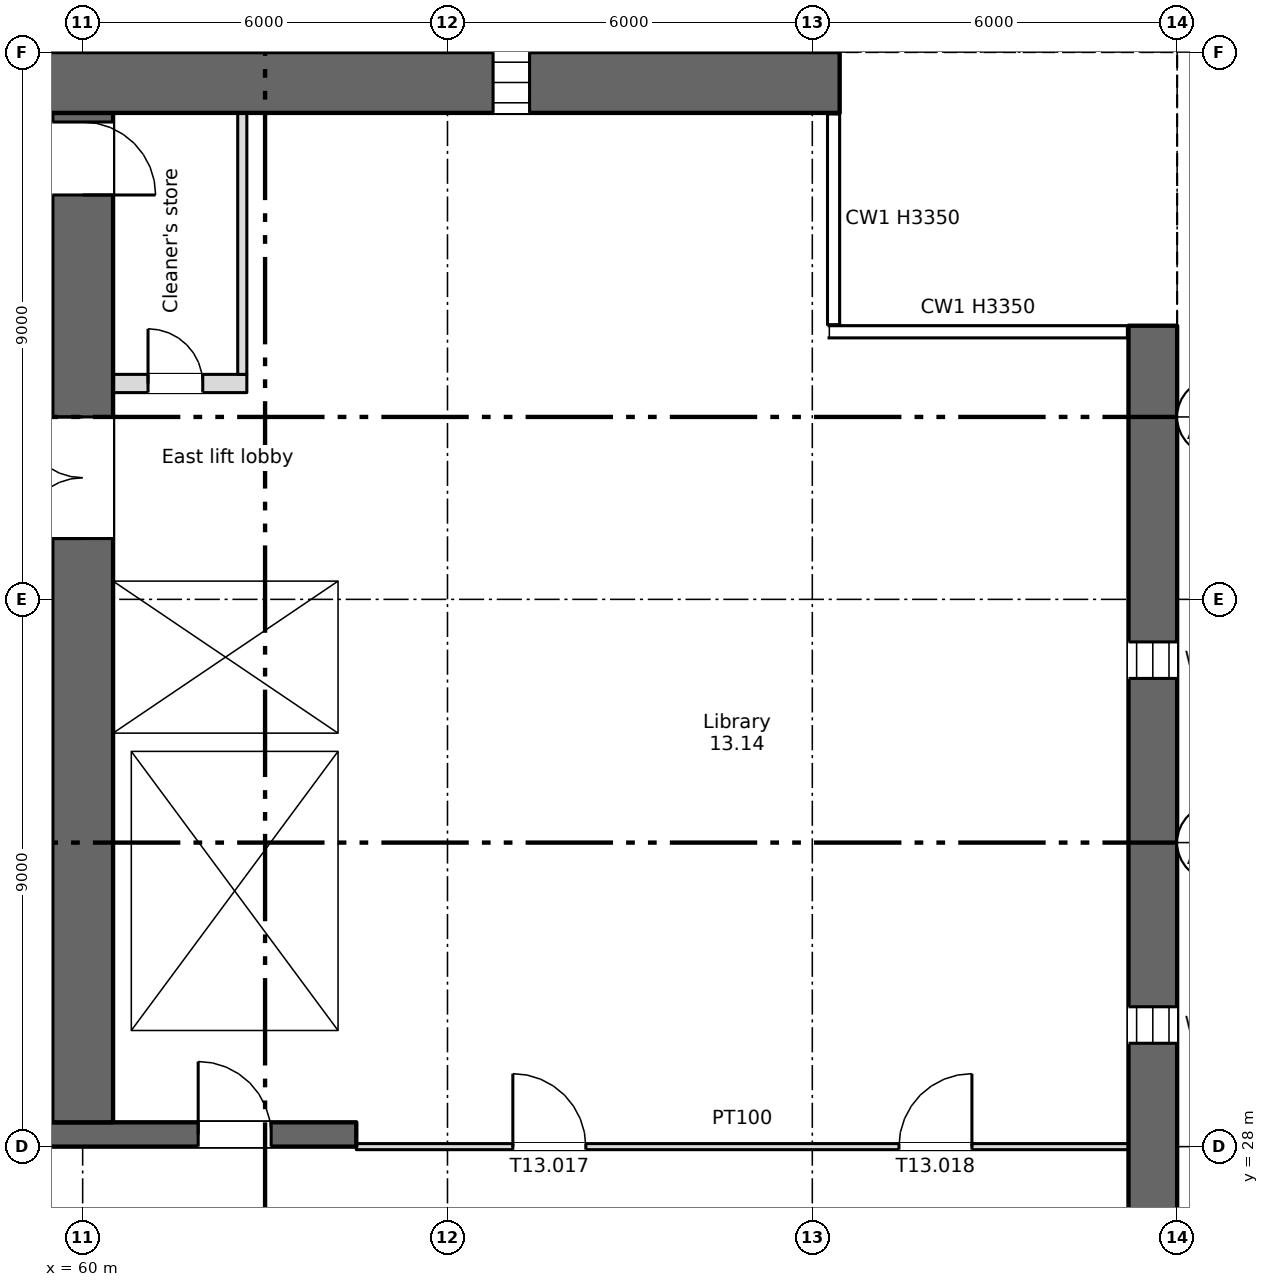
"""IFC4 building model, lengths in metres.
Left out: names, types, materials, properties, quantities, classifications, styles, units other than length and angle.
Written with IfcOpenShell. Run it as: python <this file> out.ifc"""

import sys

from ifc_helpers import new_model, si_unit, direction, frame, frame_2d, origin, place, context, subcontext, project, spatial, rectangle, extrude, element, fill, save


model = new_model("IFC4")
c1 = context("Model", 3, precision=1e-05, world=origin(), true_north=direction((0.0, 1.0)))
c2 = subcontext(c1, "Body", "Model", "MODEL_VIEW")
j1 = project(units=[si_unit("LENGTHUNIT", "METRE"), si_unit("PLANEANGLEUNIT", "RADIAN")], contexts=[c1])
p1 = place(None, origin())
s1 = spatial("IfcSite", under=j1, at=p1, CompositionType="ELEMENT")
p2 = place(p1, origin())
s2 = spatial("IfcBuilding", under=s1, at=p2, CompositionType="ELEMENT")
p3 = place(p2, frame((0.0, 0.0, 67.5)))
s3 = spatial("IfcBuildingStorey", under=s2, at=p3, CompositionType="ELEMENT", Elevation=67.5)
p4 = place(p3, frame((77.6, 4.5, 0.0), z_axis=(0.0, 0.0, 1.0), x_axis=(0.0, 1.0, 0.0)))
e1 = element("IfcWall", 1, at=p4, inside=s3, PredefinedType="SHEAR", context=c2, shape_type="SweptSolid", body=[
    extrude(rectangle(XDim=37.0, YDim=0.8, at=frame_2d((18.5, 0.0))), origin(), (0.0, 0.0, 1.0), 3.35),
])
p5 = place(p4, frame((1.2, 0.0, 0.6)))
e2 = element("IfcOpeningElement", 2, at=p5, cuts=e1, PredefinedType="OPENING", context=c2, shape_type="SweptSolid", body=[
    extrude(rectangle(XDim=0.6, YDim=2.4, at=frame_2d((0.3, 1.2))), frame((0.0, 0.41, 0.0), z_axis=(0.0, -1.0, 0.0), x_axis=(1.0, 0.0, 0.0)), (0.0, 0.0, 1.0), 0.82),
])
p6 = place(p4, frame((7.2, 0.0, 0.6)))
e3 = element("IfcOpeningElement", 3, at=p6, cuts=e1, PredefinedType="OPENING", context=c2, shape_type="SweptSolid", body=[
    extrude(rectangle(XDim=0.6, YDim=2.4, at=frame_2d((0.3, 1.2))), frame((0.0, 0.41, 0.0), z_axis=(0.0, -1.0, 0.0), x_axis=(1.0, 0.0, 0.0)), (0.0, 0.0, 1.0), 0.82),
])
p7 = place(p4, frame((13.2, 0.0, 0.6)))
e4 = element("IfcOpeningElement", 4, at=p7, cuts=e1, PredefinedType="OPENING", context=c2, shape_type="SweptSolid", body=[
    extrude(rectangle(XDim=0.6, YDim=2.4, at=frame_2d((0.3, 1.2))), frame((0.0, 0.41, 0.0), z_axis=(0.0, -1.0, 0.0), x_axis=(1.0, 0.0, 0.0)), (0.0, 0.0, 1.0), 0.82),
])
p8 = place(p4, frame((19.2, 0.0, 0.6)))
e5 = element("IfcOpeningElement", 5, at=p8, cuts=e1, PredefinedType="OPENING", context=c2, shape_type="SweptSolid", body=[
    extrude(rectangle(XDim=0.6, YDim=2.4, at=frame_2d((0.3, 1.2))), frame((0.0, 0.41, 0.0), z_axis=(0.0, -1.0, 0.0), x_axis=(1.0, 0.0, 0.0)), (0.0, 0.0, 1.0), 0.82),
])
p9 = place(p4, frame((25.2, 0.0, 0.6)))
e6 = element("IfcOpeningElement", 6, at=p9, cuts=e1, PredefinedType="OPENING", context=c2, shape_type="SweptSolid", body=[
    extrude(rectangle(XDim=0.6, YDim=2.4, at=frame_2d((0.3, 1.2))), frame((0.0, 0.41, 0.0), z_axis=(0.0, -1.0, 0.0), x_axis=(1.0, 0.0, 0.0)), (0.0, 0.0, 1.0), 0.82),
])
p10 = place(p4, frame((31.2, 0.0, 0.6)))
e7 = element("IfcOpeningElement", 7, at=p10, cuts=e1, PredefinedType="OPENING", context=c2, shape_type="SweptSolid", body=[
    extrude(rectangle(XDim=0.6, YDim=2.4, at=frame_2d((0.3, 1.2))), frame((0.0, 0.41, 0.0), z_axis=(0.0, -1.0, 0.0), x_axis=(1.0, 0.0, 0.0)), (0.0, 0.0, 1.0), 0.82),
])
p11 = place(p3, frame((5.55, 45.5, 0.0), z_axis=(0.0, 0.0, 1.0), x_axis=(1.0, 0.0, 0.0)))
e8 = element("IfcWall", 8, at=p11, inside=s3, PredefinedType="SHEAR", context=c2, shape_type="SweptSolid", body=[
    extrude(rectangle(XDim=66.9, YDim=1.0, at=frame_2d((33.45, 0.0))), origin(), (0.0, 0.0, 1.0), 3.35),
])
p12 = place(p11, frame((1.2, 0.0, 0.6)))
e9 = element("IfcOpeningElement", 9, at=p12, cuts=e8, PredefinedType="OPENING", context=c2, shape_type="SweptSolid", body=[
    extrude(rectangle(XDim=0.6, YDim=2.4, at=frame_2d((0.3, 1.2))), frame((0.0, 0.51, 0.0), z_axis=(0.0, -1.0, 0.0), x_axis=(1.0, 0.0, 0.0)), (0.0, 0.0, 1.0), 1.02),
])
p13 = place(p11, frame((7.2, 0.0, 0.6)))
e10 = element("IfcOpeningElement", 10, at=p13, cuts=e8, PredefinedType="OPENING", context=c2, shape_type="SweptSolid", body=[
    extrude(rectangle(XDim=0.6, YDim=2.4, at=frame_2d((0.3, 1.2))), frame((0.0, 0.51, 0.0), z_axis=(0.0, -1.0, 0.0), x_axis=(1.0, 0.0, 0.0)), (0.0, 0.0, 1.0), 1.02),
])
p14 = place(p11, frame((61.2, 0.0, 0.6)))
e11 = element("IfcOpeningElement", 11, at=p14, cuts=e8, PredefinedType="OPENING", context=c2, shape_type="SweptSolid", body=[
    extrude(rectangle(XDim=0.6, YDim=2.4, at=frame_2d((0.3, 1.2))), frame((0.0, 0.51, 0.0), z_axis=(0.0, -1.0, 0.0), x_axis=(1.0, 0.0, 0.0)), (0.0, 0.0, 1.0), 1.02),
])
p15 = place(p3, frame((6.7, 28.2, 0.0), z_axis=(0.0, 0.0, 1.0), x_axis=(1.0, 0.0, 0.0)))
e12 = element("IfcWall", 12, at=p15, inside=s3, PredefinedType="SHEAR", context=c2, shape_type="SweptSolid", body=[
    extrude(rectangle(XDim=57.8, YDim=0.4, at=frame_2d((28.9, 0.0))), origin(), (0.0, 0.0, 1.0), 3.35),
])
p16 = place(p15, frame((12.562, 0.0, 0.0)))
e13 = element("IfcOpeningElement", 13, at=p16, cuts=e12, PredefinedType="OPENING", context=c2, shape_type="SweptSolid", body=[
    extrude(rectangle(XDim=0.9, YDim=2.1, at=frame_2d((0.45, 1.05))), frame((0.0, 0.21, 0.0), z_axis=(0.0, -1.0, 0.0), x_axis=(1.0, 0.0, 0.0)), (0.0, 0.0, 1.0), 0.42),
])
p17 = place(p15, frame((15.137, 0.0, 0.0)))
e14 = element("IfcOpeningElement", 14, at=p17, cuts=e12, PredefinedType="OPENING", context=c2, shape_type="SweptSolid", body=[
    extrude(rectangle(XDim=0.9, YDim=2.1, at=frame_2d((0.45, 1.05))), frame((0.0, 0.21, 0.0), z_axis=(0.0, -1.0, 0.0), x_axis=(1.0, 0.0, 0.0)), (0.0, 0.0, 1.0), 0.42),
])
p18 = place(p15, frame((49.85, 0.0, 0.0)))
e15 = element("IfcOpeningElement", 15, at=p18, cuts=e12, PredefinedType="OPENING", context=c2, shape_type="SweptSolid", body=[
    extrude(rectangle(XDim=0.9, YDim=2.1, at=frame_2d((0.45, 1.05))), frame((0.0, 0.21, 0.0), z_axis=(0.0, -1.0, 0.0), x_axis=(1.0, 0.0, 0.0)), (0.0, 0.0, 1.0), 0.42),
])
p19 = place(p15, frame((0.562, 0.0, 0.0)))
e16 = element("IfcOpeningElement", 16, at=p19, cuts=e12, PredefinedType="OPENING", context=c2, shape_type="SweptSolid", body=[
    extrude(rectangle(XDim=0.9, YDim=2.1, at=frame_2d((0.45, 1.05))), frame((0.0, 0.21, 0.0), z_axis=(0.0, -1.0, 0.0), x_axis=(1.0, 0.0, 0.0)), (0.0, 0.0, 1.0), 0.42),
])
p20 = place(p15, frame((2.137, 0.0, 0.0)))
e17 = element("IfcOpeningElement", 17, at=p20, cuts=e12, PredefinedType="OPENING", context=c2, shape_type="SweptSolid", body=[
    extrude(rectangle(XDim=0.9, YDim=2.1, at=frame_2d((0.45, 1.05))), frame((0.0, 0.21, 0.0), z_axis=(0.0, -1.0, 0.0), x_axis=(1.0, 0.0, 0.0)), (0.0, 0.0, 1.0), 0.42),
])
p21 = place(p15, frame((4.7, 0.0, 0.0)))
e18 = element("IfcOpeningElement", 18, at=p21, cuts=e12, PredefinedType="OPENING", context=c2, shape_type="SweptSolid", body=[
    extrude(rectangle(XDim=1.2, YDim=2.1, at=frame_2d((0.6, 1.05))), frame((0.0, 0.21, 0.0), z_axis=(0.0, -1.0, 0.0), x_axis=(1.0, 0.0, 0.0)), (0.0, 0.0, 1.0), 0.42),
])
p22 = place(p15, frame((31.7, 0.0, 0.0)))
e19 = element("IfcOpeningElement", 19, at=p22, cuts=e12, PredefinedType="OPENING", context=c2, shape_type="SweptSolid", body=[
    extrude(rectangle(XDim=1.2, YDim=2.1, at=frame_2d((0.6, 1.05))), frame((0.0, 0.21, 0.0), z_axis=(0.0, -1.0, 0.0), x_axis=(1.0, 0.0, 0.0)), (0.0, 0.0, 1.0), 0.42),
])
p23 = place(p15, frame((55.2, 0.0, 0.0)))
e20 = element("IfcOpeningElement", 20, at=p23, cuts=e12, PredefinedType="OPENING", context=c2, shape_type="SweptSolid", body=[
    extrude(rectangle(XDim=1.2, YDim=2.1, at=frame_2d((0.6, 1.05))), frame((0.0, 0.21, 0.0), z_axis=(0.0, -1.0, 0.0), x_axis=(1.0, 0.0, 0.0)), (0.0, 0.0, 1.0), 0.42),
])
p24 = place(p15, frame((21.7, 0.0, 0.0)))
e21 = element("IfcOpeningElement", 21, at=p24, cuts=e12, PredefinedType="OPENING", context=c2, shape_type="SweptSolid", body=[
    extrude(rectangle(XDim=1.2, YDim=2.1, at=frame_2d((0.6, 1.05))), frame((0.0, 0.21, 0.0), z_axis=(0.0, -1.0, 0.0), x_axis=(1.0, 0.0, 0.0)), (0.0, 0.0, 1.0), 0.42),
])
p25 = place(p15, frame((41.7, 0.0, 0.0)))
e22 = element("IfcOpeningElement", 22, at=p25, cuts=e12, PredefinedType="OPENING", context=c2, shape_type="SweptSolid", body=[
    extrude(rectangle(XDim=1.2, YDim=2.1, at=frame_2d((0.6, 1.05))), frame((0.0, 0.21, 0.0), z_axis=(0.0, -1.0, 0.0), x_axis=(1.0, 0.0, 0.0)), (0.0, 0.0, 1.0), 0.42),
])
p26 = place(p15, frame((24.85, 0.0, 0.0)))
e23 = element("IfcOpeningElement", 23, at=p26, cuts=e12, PredefinedType="OPENING", context=c2, shape_type="SweptSolid", body=[
    extrude(rectangle(XDim=2.4, YDim=2.1, at=frame_2d((1.2, 1.05))), frame((0.0, 0.21, 0.0), z_axis=(0.0, -1.0, 0.0), x_axis=(1.0, 0.0, 0.0)), (0.0, 0.0, 1.0), 0.42),
])
p27 = place(p15, frame((37.35, 0.0, 0.0)))
e24 = element("IfcOpeningElement", 24, at=p27, cuts=e12, PredefinedType="OPENING", context=c2, shape_type="SweptSolid", body=[
    extrude(rectangle(XDim=2.4, YDim=2.1, at=frame_2d((1.2, 1.05))), frame((0.0, 0.21, 0.0), z_axis=(0.0, -1.0, 0.0), x_axis=(1.0, 0.0, 0.0)), (0.0, 0.0, 1.0), 0.42),
])
p28 = place(p15, frame((7.85, 0.0, 0.0)))
e25 = element("IfcOpeningElement", 25, at=p28, cuts=e12, PredefinedType="OPENING", context=c2, shape_type="SweptSolid", body=[
    extrude(rectangle(XDim=2.4, YDim=2.1, at=frame_2d((1.2, 1.05))), frame((0.0, 0.21, 0.0), z_axis=(0.0, -1.0, 0.0), x_axis=(1.0, 0.0, 0.0)), (0.0, 0.0, 1.0), 0.42),
])
p29 = place(p15, frame((28.85, 0.0, 0.0)))
e26 = element("IfcOpeningElement", 26, at=p29, cuts=e12, PredefinedType="OPENING", context=c2, shape_type="SweptSolid", body=[
    extrude(rectangle(XDim=0.9, YDim=2.1, at=frame_2d((0.45, 1.05))), frame((0.0, 0.21, 0.0), z_axis=(0.0, -1.0, 0.0), x_axis=(1.0, 0.0, 0.0)), (0.0, 0.0, 1.0), 0.42),
])
p30 = place(p15, frame((34.85, 0.0, 0.0)))
e27 = element("IfcOpeningElement", 27, at=p30, cuts=e12, PredefinedType="OPENING", context=c2, shape_type="SweptSolid", body=[
    extrude(rectangle(XDim=0.9, YDim=2.1, at=frame_2d((0.45, 1.05))), frame((0.0, 0.21, 0.0), z_axis=(0.0, -1.0, 0.0), x_axis=(1.0, 0.0, 0.0)), (0.0, 0.0, 1.0), 0.42),
])
p31 = place(p3, frame((64.35, 34.8, 0.0), z_axis=(0.0, 0.0, 1.0), x_axis=(0.0, 1.0, 0.0)))
e28 = element("IfcWall", 28, at=p31, inside=s3, PredefinedType="SHEAR", context=c2, shape_type="SweptSolid", body=[
    extrude(rectangle(XDim=10.2, YDim=0.3, at=frame_2d((5.1, 0.0))), origin(), (0.0, 0.0, 1.0), 3.35),
])
p32 = place(p3, frame((60.0, 28.4, 0.0), z_axis=(0.0, 0.0, 1.0), x_axis=(0.0, 1.0, 0.0)))
e29 = element("IfcWall", 29, at=p32, inside=s3, PredefinedType="SHEAR", context=c2, shape_type="SweptSolid", body=[
    extrude(rectangle(XDim=16.6, YDim=1.0, at=frame_2d((8.3, 0.0))), origin(), (0.0, 0.0, 1.0), 3.35),
])
p33 = place(p32, frame((9.6, 0.0, 0.0)))
e30 = element("IfcOpeningElement", 30, at=p33, cuts=e29, PredefinedType="OPENING", context=c2, shape_type="SweptSolid", body=[
    extrude(rectangle(XDim=2.0, YDim=2.1, at=frame_2d((1.0, 1.05))), frame((0.0, 0.51, 0.0), z_axis=(0.0, -1.0, 0.0), x_axis=(1.0, 0.0, 0.0)), (0.0, 0.0, 1.0), 1.02),
])
p34 = place(p32, frame((15.25, 0.0, 0.0)))
e31 = element("IfcOpeningElement", 31, at=p34, cuts=e29, PredefinedType="OPENING", context=c2, shape_type="SweptSolid", body=[
    extrude(rectangle(XDim=1.2, YDim=2.1, at=frame_2d((0.6, 1.05))), frame((0.0, 0.51, 0.0), z_axis=(0.0, -1.0, 0.0), x_axis=(1.0, 0.0, 0.0)), (0.0, 0.0, 1.0), 1.02),
])
for number, where, z_axis, x_axis in (
    (32, (60.65, 28.4, 0.0), (0.0, 0.0, 1.0), (0.0, 1.0, 0.0)),
    (33, (64.35, 28.4, 0.0), (0.0, 0.0, 1.0), (0.0, 1.0, 0.0)),
):
    element("IfcWall", number, at=place(p3, frame(where, z_axis=z_axis, x_axis=x_axis)), inside=s3, PredefinedType="SHEAR", context=c2, shape_type="SweptSolid", body=[
        extrude(rectangle(XDim=6.1, YDim=0.3, at=frame_2d((3.05, 0.0))), origin(), (0.0, 0.0, 1.0), 3.35),
    ])
p35 = place(p3, frame((47.3, 34.65, 0.0), z_axis=(0.0, 0.0, 1.0), x_axis=(1.0, 0.0, 0.0)))
e34 = element("IfcWall", 34, at=p35, inside=s3, PredefinedType="SHEAR", context=c2, shape_type="SweptSolid", body=[
    extrude(rectangle(XDim=12.2, YDim=0.3, at=frame_2d((6.1, 0.0))), origin(), (0.0, 0.0, 1.0), 3.35),
])
p36 = place(p35, frame((1.3, 0.0, 0.0)))
e35 = element("IfcOpeningElement", 35, at=p36, cuts=e34, PredefinedType="OPENING", context=c2, shape_type="SweptSolid", body=[
    extrude(rectangle(XDim=1.1, YDim=2.1, at=frame_2d((0.55, 1.05))), frame((0.0, 0.16, 0.0), z_axis=(0.0, -1.0, 0.0), x_axis=(1.0, 0.0, 0.0)), (0.0, 0.0, 1.0), 0.32),
])
p37 = place(p3, frame((60.5, 34.65, 0.0), z_axis=(0.0, 0.0, 1.0), x_axis=(1.0, 0.0, 0.0)))
e36 = element("IfcWall", 36, at=p37, inside=s3, PredefinedType="SHEAR", context=c2, shape_type="SweptSolid", body=[
    extrude(rectangle(XDim=4.0, YDim=0.3, at=frame_2d((2.0, 0.0))), origin(), (0.0, 0.0, 1.0), 3.35),
])
p38 = place(p3, frame((60.5, 37.45, 0.0), z_axis=(0.0, 0.0, 1.0), x_axis=(1.0, 0.0, 0.0)))
e37 = element("IfcWall", 37, at=p38, inside=s3, PredefinedType="SHEAR", context=c2, shape_type="SweptSolid", body=[
    extrude(rectangle(XDim=3.7, YDim=0.3, at=frame_2d((1.85, 0.0))), origin(), (0.0, 0.0, 1.0), 3.35),
])
p39 = place(p38, frame((1.3, 0.0, 0.0)))
e38 = element("IfcOpeningElement", 38, at=p39, cuts=e37, PredefinedType="OPENING", context=c2, shape_type="SweptSolid", body=[
    extrude(rectangle(XDim=1.1, YDim=2.1, at=frame_2d((0.55, 1.05))), frame((0.0, 0.16, 0.0), z_axis=(0.0, -1.0, 0.0), x_axis=(1.0, 0.0, 0.0)), (0.0, 0.0, 1.0), 0.32),
])
p40 = place(p3, frame((60.5, 40.55, 0.0), z_axis=(0.0, 0.0, 1.0), x_axis=(1.0, 0.0, 0.0)))
e39 = element("IfcWall", 39, at=p40, inside=s3, PredefinedType="PARTITIONING", context=c2, shape_type="SweptSolid", body=[
    extrude(rectangle(XDim=2.2, YDim=0.3, at=frame_2d((1.1, 0.0))), origin(), (0.0, 0.0, 1.0), 3.35),
])
p41 = place(p40, frame((0.575, 0.0, 0.0)))
e40 = element("IfcOpeningElement", 40, at=p41, cuts=e39, PredefinedType="OPENING", context=c2, shape_type="SweptSolid", body=[
    extrude(rectangle(XDim=0.9, YDim=2.1, at=frame_2d((0.45, 1.05))), frame((0.0, 0.16, 0.0), z_axis=(0.0, -1.0, 0.0), x_axis=(1.0, 0.0, 0.0)), (0.0, 0.0, 1.0), 0.32),
])
p42 = place(p3, frame((62.625, 40.7, 0.0), z_axis=(0.0, 0.0, 1.0), x_axis=(0.0, 1.0, 0.0)))
e41 = element("IfcWall", 41, at=p42, inside=s3, PredefinedType="PARTITIONING", context=c2, shape_type="SweptSolid", body=[
    extrude(rectangle(XDim=4.3, YDim=0.15, at=frame_2d((2.15, 0.0))), origin(), (0.0, 0.0, 1.0), 3.35),
])
p43 = place(p3, frame((64.5, 28.0, 0.0), z_axis=(0.0, 0.0, 1.0), x_axis=(1.0, 0.0, 0.0)))
e42 = element("IfcWall", 42, at=p43, inside=s3, PredefinedType="PARTITIONING", context=c2, shape_type="SweptSolid", body=[
    extrude(rectangle(XDim=12.7, YDim=0.1, at=frame_2d((6.35, 0.0))), origin(), (0.0, 0.0, 1.0), 3.35),
])
p44 = place(p43, frame((2.575, 0.0, 0.0)))
e43 = element("IfcOpeningElement", 43, at=p44, cuts=e42, PredefinedType="OPENING", context=c2, shape_type="SweptSolid", body=[
    extrude(rectangle(XDim=1.2, YDim=2.1, at=frame_2d((0.6, 1.05))), frame((0.0, 0.06, 0.0), z_axis=(0.0, -1.0, 0.0), x_axis=(1.0, 0.0, 0.0)), (0.0, 0.0, 1.0), 0.12),
])
p45 = place(p43, frame((8.925, 0.0, 0.0)))
e44 = element("IfcOpeningElement", 44, at=p45, cuts=e42, PredefinedType="OPENING", context=c2, shape_type="SweptSolid", body=[
    extrude(rectangle(XDim=1.2, YDim=2.1, at=frame_2d((0.6, 1.05))), frame((0.0, 0.06, 0.0), z_axis=(0.0, -1.0, 0.0), x_axis=(1.0, 0.0, 0.0)), (0.0, 0.0, 1.0), 0.12),
])
p46 = place(p14, origin())
e45 = element("IfcWindow", 45, at=p46, inside=s3, PartitioningType="SINGLE_PANEL", PredefinedType="WINDOW", context=c2, shape_type="SweptSolid", body=[
    extrude(rectangle(XDim=0.6, YDim=2.4, at=frame_2d((0.3, 1.2))), frame((0.0, 0.03, 0.0), z_axis=(0.0, -1.0, 0.0), x_axis=(1.0, 0.0, 0.0)), (0.0, 0.0, 1.0), 0.06),
])
fill(e11, e45)
p47 = place(p9, origin())
e46 = element("IfcWindow", 46, at=p47, inside=s3, PartitioningType="SINGLE_PANEL", PredefinedType="WINDOW", context=c2, shape_type="SweptSolid", body=[
    extrude(rectangle(XDim=0.6, YDim=2.4, at=frame_2d((0.3, 1.2))), frame((0.0, 0.03, 0.0), z_axis=(0.0, -1.0, 0.0), x_axis=(1.0, 0.0, 0.0)), (0.0, 0.0, 1.0), 0.06),
])
fill(e6, e46)
p48 = place(p10, origin())
e47 = element("IfcWindow", 47, at=p48, inside=s3, PartitioningType="SINGLE_PANEL", PredefinedType="WINDOW", context=c2, shape_type="SweptSolid", body=[
    extrude(rectangle(XDim=0.6, YDim=2.4, at=frame_2d((0.3, 1.2))), frame((0.0, 0.03, 0.0), z_axis=(0.0, -1.0, 0.0), x_axis=(1.0, 0.0, 0.0)), (0.0, 0.0, 1.0), 0.06),
])
fill(e7, e47)
p49 = place(p41, origin())
e48 = element("IfcDoor", 48, at=p49, inside=s3, OperationType="SINGLE_SWING_LEFT", PredefinedType="DOOR", context=c2, shape_type="SweptSolid", body=[
    extrude(rectangle(XDim=0.9, YDim=2.1, at=frame_2d((0.45, 1.05))), frame((0.0, 0.025, 0.0), z_axis=(0.0, -1.0, 0.0), x_axis=(1.0, 0.0, 0.0)), (0.0, 0.0, 1.0), 0.05),
])
fill(e40, e48)
p50 = place(p39, origin())
e49 = element("IfcDoor", 49, at=p50, inside=s3, OperationType="SLIDING_TO_LEFT", PredefinedType="DOOR", context=c2, shape_type="SweptSolid", body=[
    extrude(rectangle(XDim=1.1, YDim=2.1, at=frame_2d((0.55, 1.05))), frame((0.0, 0.025, 0.0), z_axis=(0.0, -1.0, 0.0), x_axis=(1.0, 0.0, 0.0)), (0.0, 0.0, 1.0), 0.05),
])
fill(e38, e49)
p51 = place(p23, origin())
e50 = element("IfcDoor", 50, at=p51, inside=s3, OperationType="SINGLE_SWING_LEFT", PredefinedType="DOOR", context=c2, shape_type="SweptSolid", body=[
    extrude(rectangle(XDim=1.2, YDim=2.1, at=frame_2d((0.6, 1.05))), frame((0.0, 0.025, 0.0), z_axis=(0.0, -1.0, 0.0), x_axis=(1.0, 0.0, 0.0)), (0.0, 0.0, 1.0), 0.05),
])
fill(e20, e50)
p52 = place(p33, origin())
e51 = element("IfcDoor", 51, at=p52, inside=s3, OperationType="DOUBLE_DOOR_SINGLE_SWING", PredefinedType="DOOR", context=c2, shape_type="SweptSolid", body=[
    extrude(rectangle(XDim=2.0, YDim=2.1, at=frame_2d((1.0, 1.05))), frame((0.0, 0.025, 0.0), z_axis=(0.0, -1.0, 0.0), x_axis=(1.0, 0.0, 0.0)), (0.0, 0.0, 1.0), 0.05),
])
fill(e30, e51)
p53 = place(p34, origin())
e52 = element("IfcDoor", 52, at=p53, inside=s3, OperationType="SINGLE_SWING_LEFT", PredefinedType="DOOR", context=c2, shape_type="SweptSolid", body=[
    extrude(rectangle(XDim=1.2, YDim=2.1, at=frame_2d((0.6, 1.05))), frame((0.0, 0.025, 0.0), z_axis=(0.0, -1.0, 0.0), x_axis=(1.0, 0.0, 0.0)), (0.0, 0.0, 1.0), 0.05),
])
fill(e31, e52)
p54 = place(p44, origin())
e53 = element("IfcDoor", 53, at=p54, inside=s3, OperationType="SINGLE_SWING_LEFT", PredefinedType="DOOR", context=c2, shape_type="SweptSolid", body=[
    extrude(rectangle(XDim=1.2, YDim=2.1, at=frame_2d((0.6, 1.05))), frame((0.0, 0.025, 0.0), z_axis=(0.0, -1.0, 0.0), x_axis=(1.0, 0.0, 0.0)), (0.0, 0.0, 1.0), 0.05),
])
fill(e43, e53)
p55 = place(p45, origin())
e54 = element("IfcDoor", 54, at=p55, inside=s3, OperationType="SINGLE_SWING_RIGHT", PredefinedType="DOOR", context=c2, shape_type="SweptSolid", body=[
    extrude(rectangle(XDim=1.2, YDim=2.1, at=frame_2d((0.6, 1.05))), frame((0.0, 0.025, 0.0), z_axis=(0.0, -1.0, 0.0), x_axis=(1.0, 0.0, 0.0)), (0.0, 0.0, 1.0), 0.05),
])
fill(e44, e54)
save(model, sys.argv[1])
